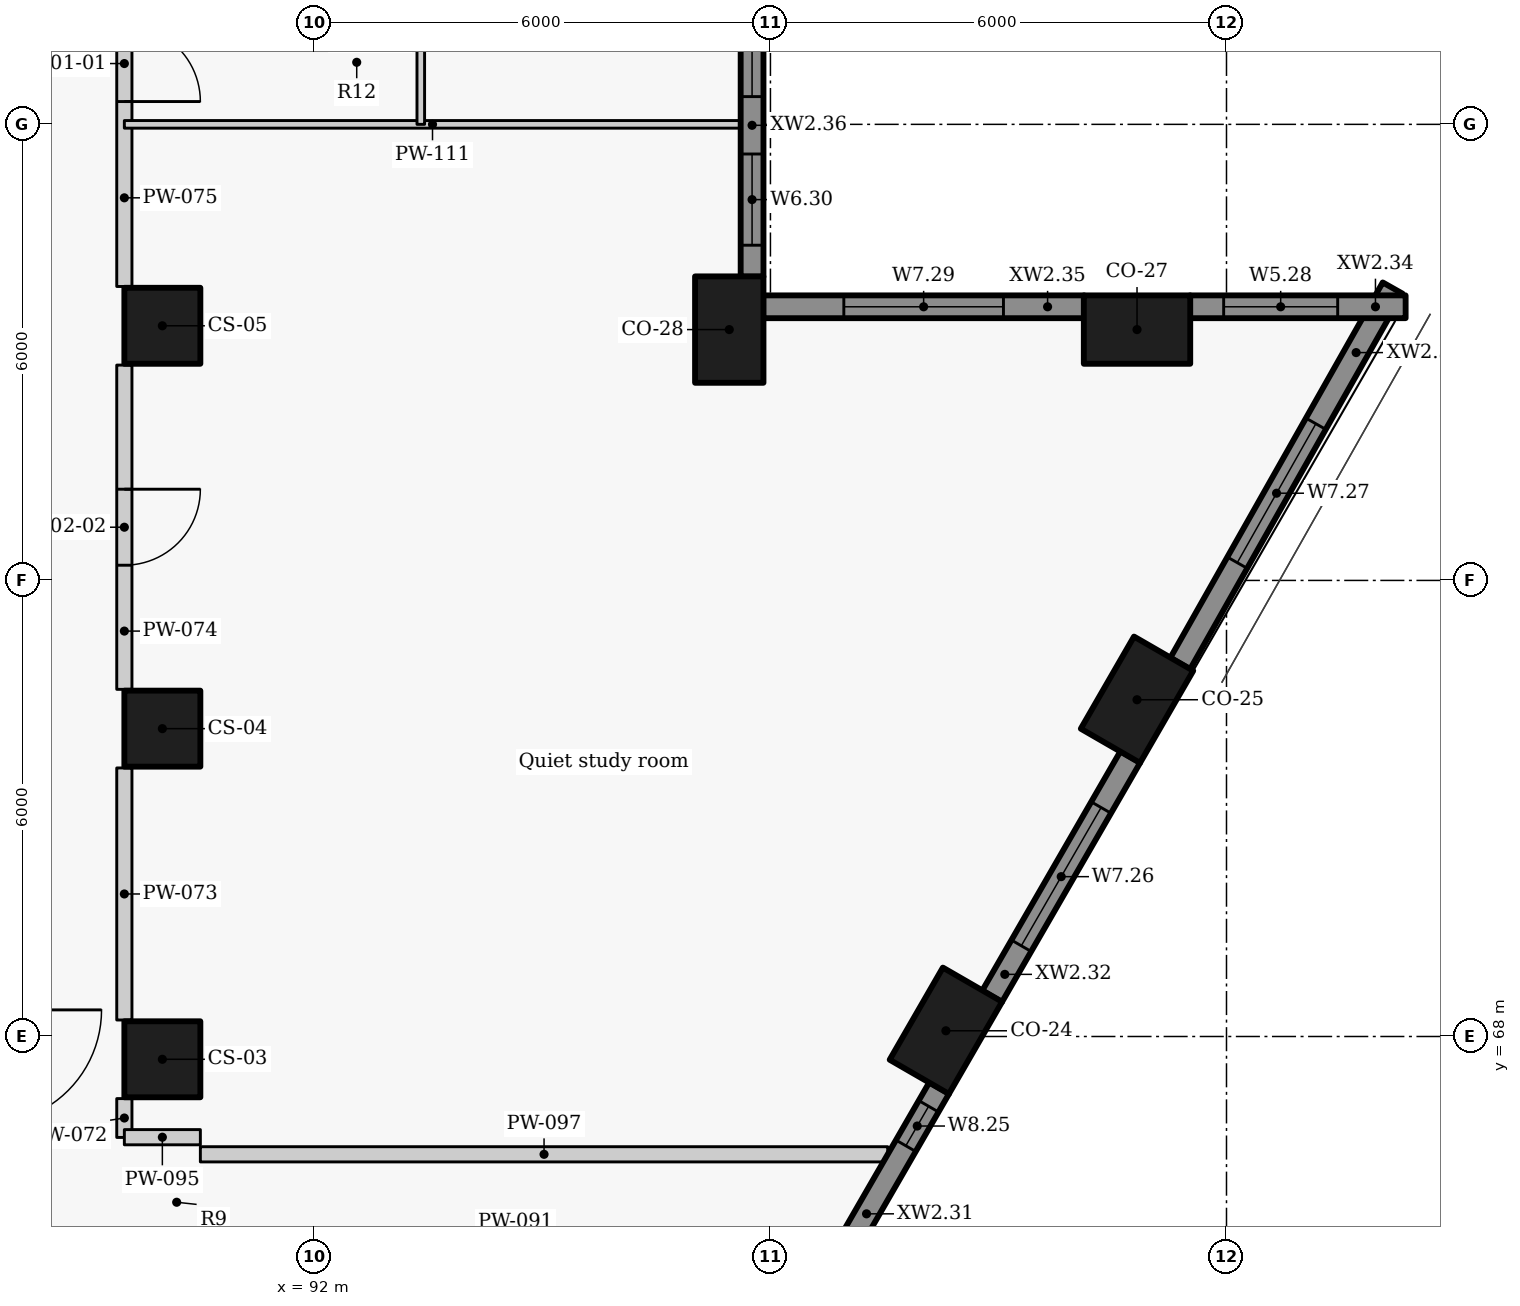
"""IFC4 building model, lengths in metres.
Left out: names, types, materials, properties, quantities, classifications, styles, units other than length and angle.
Written with IfcOpenShell. Run it as: python <this file> out.ifc"""

import sys

from ifc_helpers import new_model, si_unit, direction, frame, frame_2d, origin, origin_2d, place, context, subcontext, project, spatial, rectangle, extrude, element, fill, save


model = new_model("IFC4")
c1 = context("Model", 3, precision=1e-05, world=origin(), true_north=direction((0.0, 1.0)))
c2 = subcontext(c1, "Body", "Model", "MODEL_VIEW")
j1 = project(units=[si_unit("LENGTHUNIT", "METRE"), si_unit("PLANEANGLEUNIT", "RADIAN")], contexts=[c1])
p1 = place(None, origin())
s1 = spatial("IfcSite", under=j1, at=p1, CompositionType="ELEMENT")
p2 = place(p1, origin())
s2 = spatial("IfcBuilding", under=s1, at=p2, CompositionType="ELEMENT")
p3 = place(p2, frame((0.0, 0.0, 117.3)))
s3 = spatial("IfcBuildingStorey", under=s2, at=p3, CompositionType="ELEMENT", Elevation=117.3)
for number, where, z_axis, x_axis in (
    (1, (100.308, 68.075, 0.0), (0.0, 0.0, 1.0), (0.5, 0.866, 0.0)),
    (2, (102.823, 72.43, 0.0), (0.0, 0.0, 1.0), (0.5, 0.866, 0.0)),
    (3, (102.823, 77.3, 0.0), (0.0, 0.0, 1.0), (-1.0, 0.0, 0.0)),
    (4, (97.458, 77.3, 0.0), (0.0, 0.0, 1.0), (0.0, 1.0, 0.0)),
):
    element("IfcColumn", number, at=place(p3, frame(where, z_axis=z_axis, x_axis=x_axis)), inside=s3, PredefinedType="COLUMN", context=c2, shape_type="SweptSolid", body=[
        extrude(rectangle(XDim=1.4, YDim=0.9, at=origin_2d()), origin(), (0.0, 0.0, 1.0), 3.3),
    ])
for number, where, z_axis, x_axis in (
    (5, (90.0, 67.7, 0.0), (0.0, 0.0, 1.0), (0.0, 1.0, 0.0)),
    (6, (90.0, 72.05, 0.0), (0.0, 0.0, 1.0), (0.0, 1.0, 0.0)),
    (7, (90.0, 77.35, 0.0), (0.0, 0.0, 1.0), (0.0, 1.0, 0.0)),
):
    element("IfcColumn", number, at=place(p3, frame(where, z_axis=z_axis, x_axis=x_axis)), inside=s3, PredefinedType="COLUMN", context=c2, shape_type="SweptSolid", body=[
        extrude(rectangle(XDim=1.0, YDim=1.0, at=origin_2d()), origin(), (0.0, 0.0, 1.0), 3.3),
    ])
p4 = place(p3, frame((98.253, 63.916, 0.0), z_axis=(0.0, 0.0, 1.0), x_axis=(0.499957037901, 0.866050206543, 0.0)))
e8 = element("IfcWall", 8, at=p4, inside=s3, PredefinedType="SOLIDWALL", context=c2, shape_type="SweptSolid", body=[
    extrude(rectangle(XDim=3.934, YDim=0.3, at=frame_2d((1.967, 0.0))), origin(), (0.0, 0.0, 1.0), 2.05),
])
p5 = place(p4, frame((0.389, 0.0, 0.9)))
e9 = element("IfcOpeningElement", 9, at=p5, cuts=e8, PredefinedType="OPENING", context=c2, shape_type="SweptSolid", body=[
    extrude(rectangle(XDim=0.6, YDim=1.1, at=frame_2d((0.3, 0.55))), frame((0.0, 0.16, 0.0), z_axis=(0.0, -1.0, 0.0), x_axis=(1.0, 0.0, 0.0)), (0.0, 0.0, 1.0), 0.32),
])
p6 = place(p4, frame((3.056, 0.0, 0.9)))
e10 = element("IfcOpeningElement", 10, at=p6, cuts=e8, PredefinedType="OPENING", context=c2, shape_type="SweptSolid", body=[
    extrude(rectangle(XDim=0.6, YDim=1.1, at=frame_2d((0.3, 0.55))), frame((0.0, 0.16, 0.0), z_axis=(0.0, -1.0, 0.0), x_axis=(1.0, 0.0, 0.0)), (0.0, 0.0, 1.0), 0.32),
])
p7 = place(p3, frame((100.916, 68.528, 0.0), z_axis=(0.0, 0.0, 1.0), x_axis=(0.500009139881, 0.866020126807, 0.0)))
e11 = element("IfcWall", 11, at=p7, inside=s3, PredefinedType="SOLIDWALL", context=c2, shape_type="SweptSolid", body=[
    extrude(rectangle(XDim=3.637, YDim=0.3, at=frame_2d((1.818, 0.0))), origin(), (0.0, 0.0, 1.0), 2.05),
])
p8 = place(p7, frame((0.768, 0.0, 0.9)))
e12 = element("IfcOpeningElement", 12, at=p8, cuts=e11, PredefinedType="OPENING", context=c2, shape_type="SweptSolid", body=[
    extrude(rectangle(XDim=2.1, YDim=1.1, at=frame_2d((1.05, 0.55))), frame((0.0, 0.16, 0.0), z_axis=(0.0, -1.0, 0.0), x_axis=(1.0, 0.0, 0.0)), (0.0, 0.0, 1.0), 0.32),
])
p9 = place(p3, frame((103.391, 72.906, 0.0), z_axis=(0.0, 0.0, 1.0), x_axis=(0.492456858874, 0.870336855561, 0.0)))
e13 = element("IfcWall", 13, at=p9, inside=s3, PredefinedType="SOLIDWALL", context=c2, shape_type="SweptSolid", body=[
    extrude(rectangle(XDim=5.677, YDim=0.3, at=frame_2d((2.838, 0.0))), origin(), (0.0, 0.0, 1.0), 2.05),
])
p10 = place(p9, frame((1.525, 0.0, 0.9)))
e14 = element("IfcOpeningElement", 14, at=p10, cuts=e13, PredefinedType="OPENING", context=c2, shape_type="SweptSolid", body=[
    extrude(rectangle(XDim=2.1, YDim=1.1, at=frame_2d((1.05, 0.55))), frame((0.0, 0.16, 0.0), z_axis=(0.0, -1.0, 0.0), x_axis=(1.0, 0.0, 0.0)), (0.0, 0.0, 1.0), 0.32),
])
p11 = place(p3, frame((106.357, 77.6, 0.0), z_axis=(0.0, 0.0, 1.0), x_axis=(-1.0, 0.0, 0.0)))
e15 = element("IfcWall", 15, at=p11, inside=s3, PredefinedType="SOLIDWALL", context=c2, shape_type="SweptSolid", body=[
    extrude(rectangle(XDim=2.838, YDim=0.3, at=frame_2d((1.419, 0.0))), origin(), (0.0, 0.0, 1.0), 2.05),
])
p12 = place(p11, frame((0.894, 0.0, 0.9)))
e16 = element("IfcOpeningElement", 16, at=p12, cuts=e15, PredefinedType="OPENING", context=c2, shape_type="SweptSolid", body=[
    extrude(rectangle(XDim=1.5, YDim=1.1, at=frame_2d((0.75, 0.55))), frame((0.0, 0.16, 0.0), z_axis=(0.0, -1.0, 0.0), x_axis=(1.0, 0.0, 0.0)), (0.0, 0.0, 1.0), 0.32),
])
p13 = place(p3, frame((102.127, 77.6, 0.0), z_axis=(0.0, 0.0, 1.0), x_axis=(-1.0, 0.0, 0.0)))
e17 = element("IfcWall", 17, at=p13, inside=s3, PredefinedType="SOLIDWALL", context=c2, shape_type="SweptSolid", body=[
    extrude(rectangle(XDim=4.223, YDim=0.3, at=frame_2d((2.111, 0.0))), origin(), (0.0, 0.0, 1.0), 2.05),
])
p14 = place(p13, frame((1.061, 0.0, 0.9)))
e18 = element("IfcOpeningElement", 18, at=p14, cuts=e17, PredefinedType="OPENING", context=c2, shape_type="SweptSolid", body=[
    extrude(rectangle(XDim=2.1, YDim=1.1, at=frame_2d((1.05, 0.55))), frame((0.0, 0.16, 0.0), z_axis=(0.0, -1.0, 0.0), x_axis=(1.0, 0.0, 0.0)), (0.0, 0.0, 1.0), 0.32),
])
p15 = place(p3, frame((97.758, 77.996, 0.0), z_axis=(0.0, 0.0, 1.0), x_axis=(0.0, 1.0, 0.0)))
e19 = element("IfcWall", 19, at=p15, inside=s3, PredefinedType="SOLIDWALL", context=c2, shape_type="SweptSolid", body=[
    extrude(rectangle(XDim=4.258, YDim=0.3, at=frame_2d((2.129, 0.0))), origin(), (0.0, 0.0, 1.0), 2.05),
])
p16 = place(p15, frame((0.414, 0.0, 0.9)))
e20 = element("IfcOpeningElement", 20, at=p16, cuts=e19, PredefinedType="OPENING", context=c2, shape_type="SweptSolid", body=[
    extrude(rectangle(XDim=1.2, YDim=1.1, at=frame_2d((0.6, 0.55))), frame((0.0, 0.16, 0.0), z_axis=(0.0, -1.0, 0.0), x_axis=(1.0, 0.0, 0.0)), (0.0, 0.0, 1.0), 0.32),
])
p17 = place(p15, frame((2.369, 0.0, 0.9)))
e21 = element("IfcOpeningElement", 21, at=p17, cuts=e19, PredefinedType="OPENING", context=c2, shape_type="SweptSolid", body=[
    extrude(rectangle(XDim=1.5, YDim=1.1, at=frame_2d((0.75, 0.55))), frame((0.0, 0.16, 0.0), z_axis=(0.0, -1.0, 0.0), x_axis=(1.0, 0.0, 0.0)), (0.0, 0.0, 1.0), 0.32),
])
p18 = place(p3, frame((89.5, 66.672, 0.0), z_axis=(0.0, 0.0, 1.0), x_axis=(0.0, 1.0, 0.0)))
e22 = element("IfcWall", 22, at=p18, inside=s3, PredefinedType="PARTITIONING", context=c2, shape_type="SweptSolid", body=[
    extrude(rectangle(XDim=0.511, YDim=0.2, at=frame_2d((0.255, 0.0))), origin(), (0.0, 0.0, 1.0), 2.95),
])
p19 = place(p3, frame((89.5, 68.217, 0.0), z_axis=(0.0, 0.0, 1.0), x_axis=(0.0, 1.0, 0.0)))
e23 = element("IfcWall", 23, at=p19, inside=s3, PredefinedType="PARTITIONING", context=c2, shape_type="SweptSolid", body=[
    extrude(rectangle(XDim=3.316, YDim=0.2, at=frame_2d((1.658, 0.0))), origin(), (0.0, 0.0, 1.0), 2.95),
])
p20 = place(p3, frame((89.5, 76.833, 0.0), z_axis=(0.0, 0.0, 1.0), x_axis=(0.0, -1.0, 0.0)))
e24 = element("IfcWall", 24, at=p20, inside=s3, PredefinedType="PARTITIONING", context=c2, shape_type="SweptSolid", body=[
    extrude(rectangle(XDim=4.266, YDim=0.2, at=frame_2d((2.133, 0.0))), origin(), (0.0, 0.0, 1.0), 2.95),
])
p21 = place(p20, frame((1.633, 0.0, 0.0)))
e25 = element("IfcOpeningElement", 25, at=p21, cuts=e24, PredefinedType="OPENING", context=c2, shape_type="SweptSolid", body=[
    extrude(rectangle(XDim=1.0, YDim=2.1, at=frame_2d((0.5, 1.05))), frame((0.0, 0.11, 0.0), z_axis=(0.0, -1.0, 0.0), x_axis=(1.0, 0.0, 0.0)), (0.0, 0.0, 1.0), 0.22),
])
p22 = place(p3, frame((89.5, 82.133, 0.0), z_axis=(0.0, 0.0, 1.0), x_axis=(0.0, -1.0, 0.0)))
e26 = element("IfcWall", 26, at=p22, inside=s3, PredefinedType="PARTITIONING", context=c2, shape_type="SweptSolid", body=[
    extrude(rectangle(XDim=4.266, YDim=0.2, at=frame_2d((2.133, 0.0))), origin(), (0.0, 0.0, 1.0), 2.95),
])
p23 = place(p22, frame((0.833, 0.0, 0.0)))
e27 = element("IfcOpeningElement", 27, at=p23, cuts=e26, PredefinedType="OPENING", context=c2, shape_type="SweptSolid", body=[
    extrude(rectangle(XDim=1.0, YDim=2.1, at=frame_2d((0.5, 1.05))), frame((0.0, 0.11, 0.0), z_axis=(0.0, -1.0, 0.0), x_axis=(1.0, 0.0, 0.0)), (0.0, 0.0, 1.0), 0.22),
])
p24 = place(p3, frame((89.5, 66.675, 0.0), z_axis=(0.0, 0.0, 1.0), x_axis=(1.0, 0.0, 0.0)))
e28 = element("IfcWall", 28, at=p24, inside=s3, PredefinedType="PARTITIONING", context=c2, shape_type="SweptSolid", body=[
    extrude(rectangle(XDim=1.0, YDim=0.2, at=frame_2d((0.5, 0.0))), origin(), (0.0, 0.0, 1.0), 2.43),
])
p25 = place(p3, frame((90.5, 66.45, 0.0), z_axis=(0.0, 0.0, 1.0), x_axis=(1.0, 0.0, 0.0)))
e29 = element("IfcWall", 29, at=p25, inside=s3, PredefinedType="PARTITIONING", context=c2, shape_type="SweptSolid", body=[
    extrude(rectangle(XDim=9.043, YDim=0.2, at=frame_2d((4.521, 0.0))), origin(), (0.0, 0.0, 1.0), 2.03),
])
p26 = place(p3, frame((89.5, 80.0, 0.0), z_axis=(0.0, 0.0, 1.0), x_axis=(1.0, 0.0, 0.0)))
e30 = element("IfcWall", 30, at=p26, inside=s3, PredefinedType="PARTITIONING", context=c2, shape_type="SweptSolid", body=[
    extrude(rectangle(XDim=8.108, YDim=0.1, at=frame_2d((4.054, 0.0))), origin(), (0.0, 0.0, 1.0), 2.03),
])
p27 = place(p3, frame((93.4, 91.0, 0.0), z_axis=(0.0, 0.0, 1.0), x_axis=(0.0, -1.0, 0.0)))
e31 = element("IfcWall", 31, at=p27, inside=s3, PredefinedType="PARTITIONING", context=c2, shape_type="SweptSolid", body=[
    extrude(rectangle(XDim=11.0, YDim=0.1, at=frame_2d((5.5, 0.0))), origin(), (0.0, 0.0, 1.0), 2.95),
])
p28 = place(p27, frame((8.953, 0.0, 0.0)))
e32 = element("IfcOpeningElement", 32, at=p28, cuts=e31, PredefinedType="OPENING", context=c2, shape_type="SweptSolid", body=[
    extrude(rectangle(XDim=0.9, YDim=2.1, at=frame_2d((0.45, 1.05))), frame((0.0, 0.06, 0.0), z_axis=(0.0, -1.0, 0.0), x_axis=(1.0, 0.0, 0.0)), (0.0, 0.0, 1.0), 0.12),
])
p29 = place(p27, frame((5.76, 0.0, 0.0)))
e33 = element("IfcOpeningElement", 33, at=p29, cuts=e31, PredefinedType="OPENING", context=c2, shape_type="SweptSolid", body=[
    extrude(rectangle(XDim=0.9, YDim=2.1, at=frame_2d((0.45, 1.05))), frame((0.0, 0.06, 0.0), z_axis=(0.0, -1.0, 0.0), x_axis=(1.0, 0.0, 0.0)), (0.0, 0.0, 1.0), 0.12),
])
p30 = place(p27, frame((1.856, 0.0, 0.0)))
e34 = element("IfcOpeningElement", 34, at=p30, cuts=e31, PredefinedType="OPENING", context=c2, shape_type="SweptSolid", body=[
    extrude(rectangle(XDim=0.9, YDim=2.1, at=frame_2d((0.45, 1.05))), frame((0.0, 0.06, 0.0), z_axis=(0.0, -1.0, 0.0), x_axis=(1.0, 0.0, 0.0)), (0.0, 0.0, 1.0), 0.12),
])
p31 = place(p6, origin())
e35 = element("IfcWindow", 35, at=p31, inside=s3, PartitioningType="SINGLE_PANEL", PredefinedType="WINDOW", context=c2, shape_type="SweptSolid", body=[
    extrude(rectangle(XDim=0.6, YDim=1.1, at=frame_2d((0.3, 0.55))), frame((0.0, 0.03, 0.0), z_axis=(0.0, -1.0, 0.0), x_axis=(1.0, 0.0, 0.0)), (0.0, 0.0, 1.0), 0.06),
])
fill(e10, e35)
p32 = place(p8, origin())
e36 = element("IfcWindow", 36, at=p32, inside=s3, PartitioningType="SINGLE_PANEL", PredefinedType="WINDOW", context=c2, shape_type="SweptSolid", body=[
    extrude(rectangle(XDim=2.1, YDim=1.1, at=frame_2d((1.05, 0.55))), frame((0.0, 0.03, 0.0), z_axis=(0.0, -1.0, 0.0), x_axis=(1.0, 0.0, 0.0)), (0.0, 0.0, 1.0), 0.06),
])
fill(e12, e36)
p33 = place(p10, origin())
e37 = element("IfcWindow", 37, at=p33, inside=s3, PartitioningType="SINGLE_PANEL", PredefinedType="WINDOW", context=c2, shape_type="SweptSolid", body=[
    extrude(rectangle(XDim=2.1, YDim=1.1, at=frame_2d((1.05, 0.55))), frame((0.0, 0.03, 0.0), z_axis=(0.0, -1.0, 0.0), x_axis=(1.0, 0.0, 0.0)), (0.0, 0.0, 1.0), 0.06),
])
fill(e14, e37)
p34 = place(p12, origin())
e38 = element("IfcWindow", 38, at=p34, inside=s3, PartitioningType="SINGLE_PANEL", PredefinedType="WINDOW", context=c2, shape_type="SweptSolid", body=[
    extrude(rectangle(XDim=1.5, YDim=1.1, at=frame_2d((0.75, 0.55))), frame((0.0, 0.03, 0.0), z_axis=(0.0, -1.0, 0.0), x_axis=(1.0, 0.0, 0.0)), (0.0, 0.0, 1.0), 0.06),
])
fill(e16, e38)
p35 = place(p14, origin())
e39 = element("IfcWindow", 39, at=p35, inside=s3, PartitioningType="SINGLE_PANEL", PredefinedType="WINDOW", context=c2, shape_type="SweptSolid", body=[
    extrude(rectangle(XDim=2.1, YDim=1.1, at=frame_2d((1.05, 0.55))), frame((0.0, 0.03, 0.0), z_axis=(0.0, -1.0, 0.0), x_axis=(1.0, 0.0, 0.0)), (0.0, 0.0, 1.0), 0.06),
])
fill(e18, e39)
p36 = place(p16, origin())
e40 = element("IfcWindow", 40, at=p36, inside=s3, PartitioningType="SINGLE_PANEL", PredefinedType="WINDOW", context=c2, shape_type="SweptSolid", body=[
    extrude(rectangle(XDim=1.2, YDim=1.1, at=frame_2d((0.6, 0.55))), frame((0.0, 0.03, 0.0), z_axis=(0.0, -1.0, 0.0), x_axis=(1.0, 0.0, 0.0)), (0.0, 0.0, 1.0), 0.06),
])
fill(e20, e40)
p37 = place(p17, origin())
e41 = element("IfcWindow", 41, at=p37, inside=s3, PartitioningType="SINGLE_PANEL", PredefinedType="WINDOW", context=c2, shape_type="SweptSolid", body=[
    extrude(rectangle(XDim=1.5, YDim=1.1, at=frame_2d((0.75, 0.55))), frame((0.0, 0.03, 0.0), z_axis=(0.0, -1.0, 0.0), x_axis=(1.0, 0.0, 0.0)), (0.0, 0.0, 1.0), 0.06),
])
fill(e21, e41)
p38 = place(p21, origin())
e42 = element("IfcDoor", 42, at=p38, inside=s3, OperationType="SINGLE_SWING_LEFT", PredefinedType="DOOR", context=c2, shape_type="SweptSolid", body=[
    extrude(rectangle(XDim=1.0, YDim=2.1, at=frame_2d((0.5, 1.05))), frame((0.0, 0.025, 0.0), z_axis=(0.0, -1.0, 0.0), x_axis=(1.0, 0.0, 0.0)), (0.0, 0.0, 1.0), 0.05),
])
fill(e25, e42)
p39 = place(p23, origin())
e43 = element("IfcDoor", 43, at=p39, inside=s3, OperationType="SINGLE_SWING_RIGHT", PredefinedType="DOOR", context=c2, shape_type="SweptSolid", body=[
    extrude(rectangle(XDim=1.0, YDim=2.1, at=frame_2d((0.5, 1.05))), frame((0.0, 0.025, 0.0), z_axis=(0.0, -1.0, 0.0), x_axis=(1.0, 0.0, 0.0)), (0.0, 0.0, 1.0), 0.05),
])
fill(e27, e43)
save(model, sys.argv[1])
